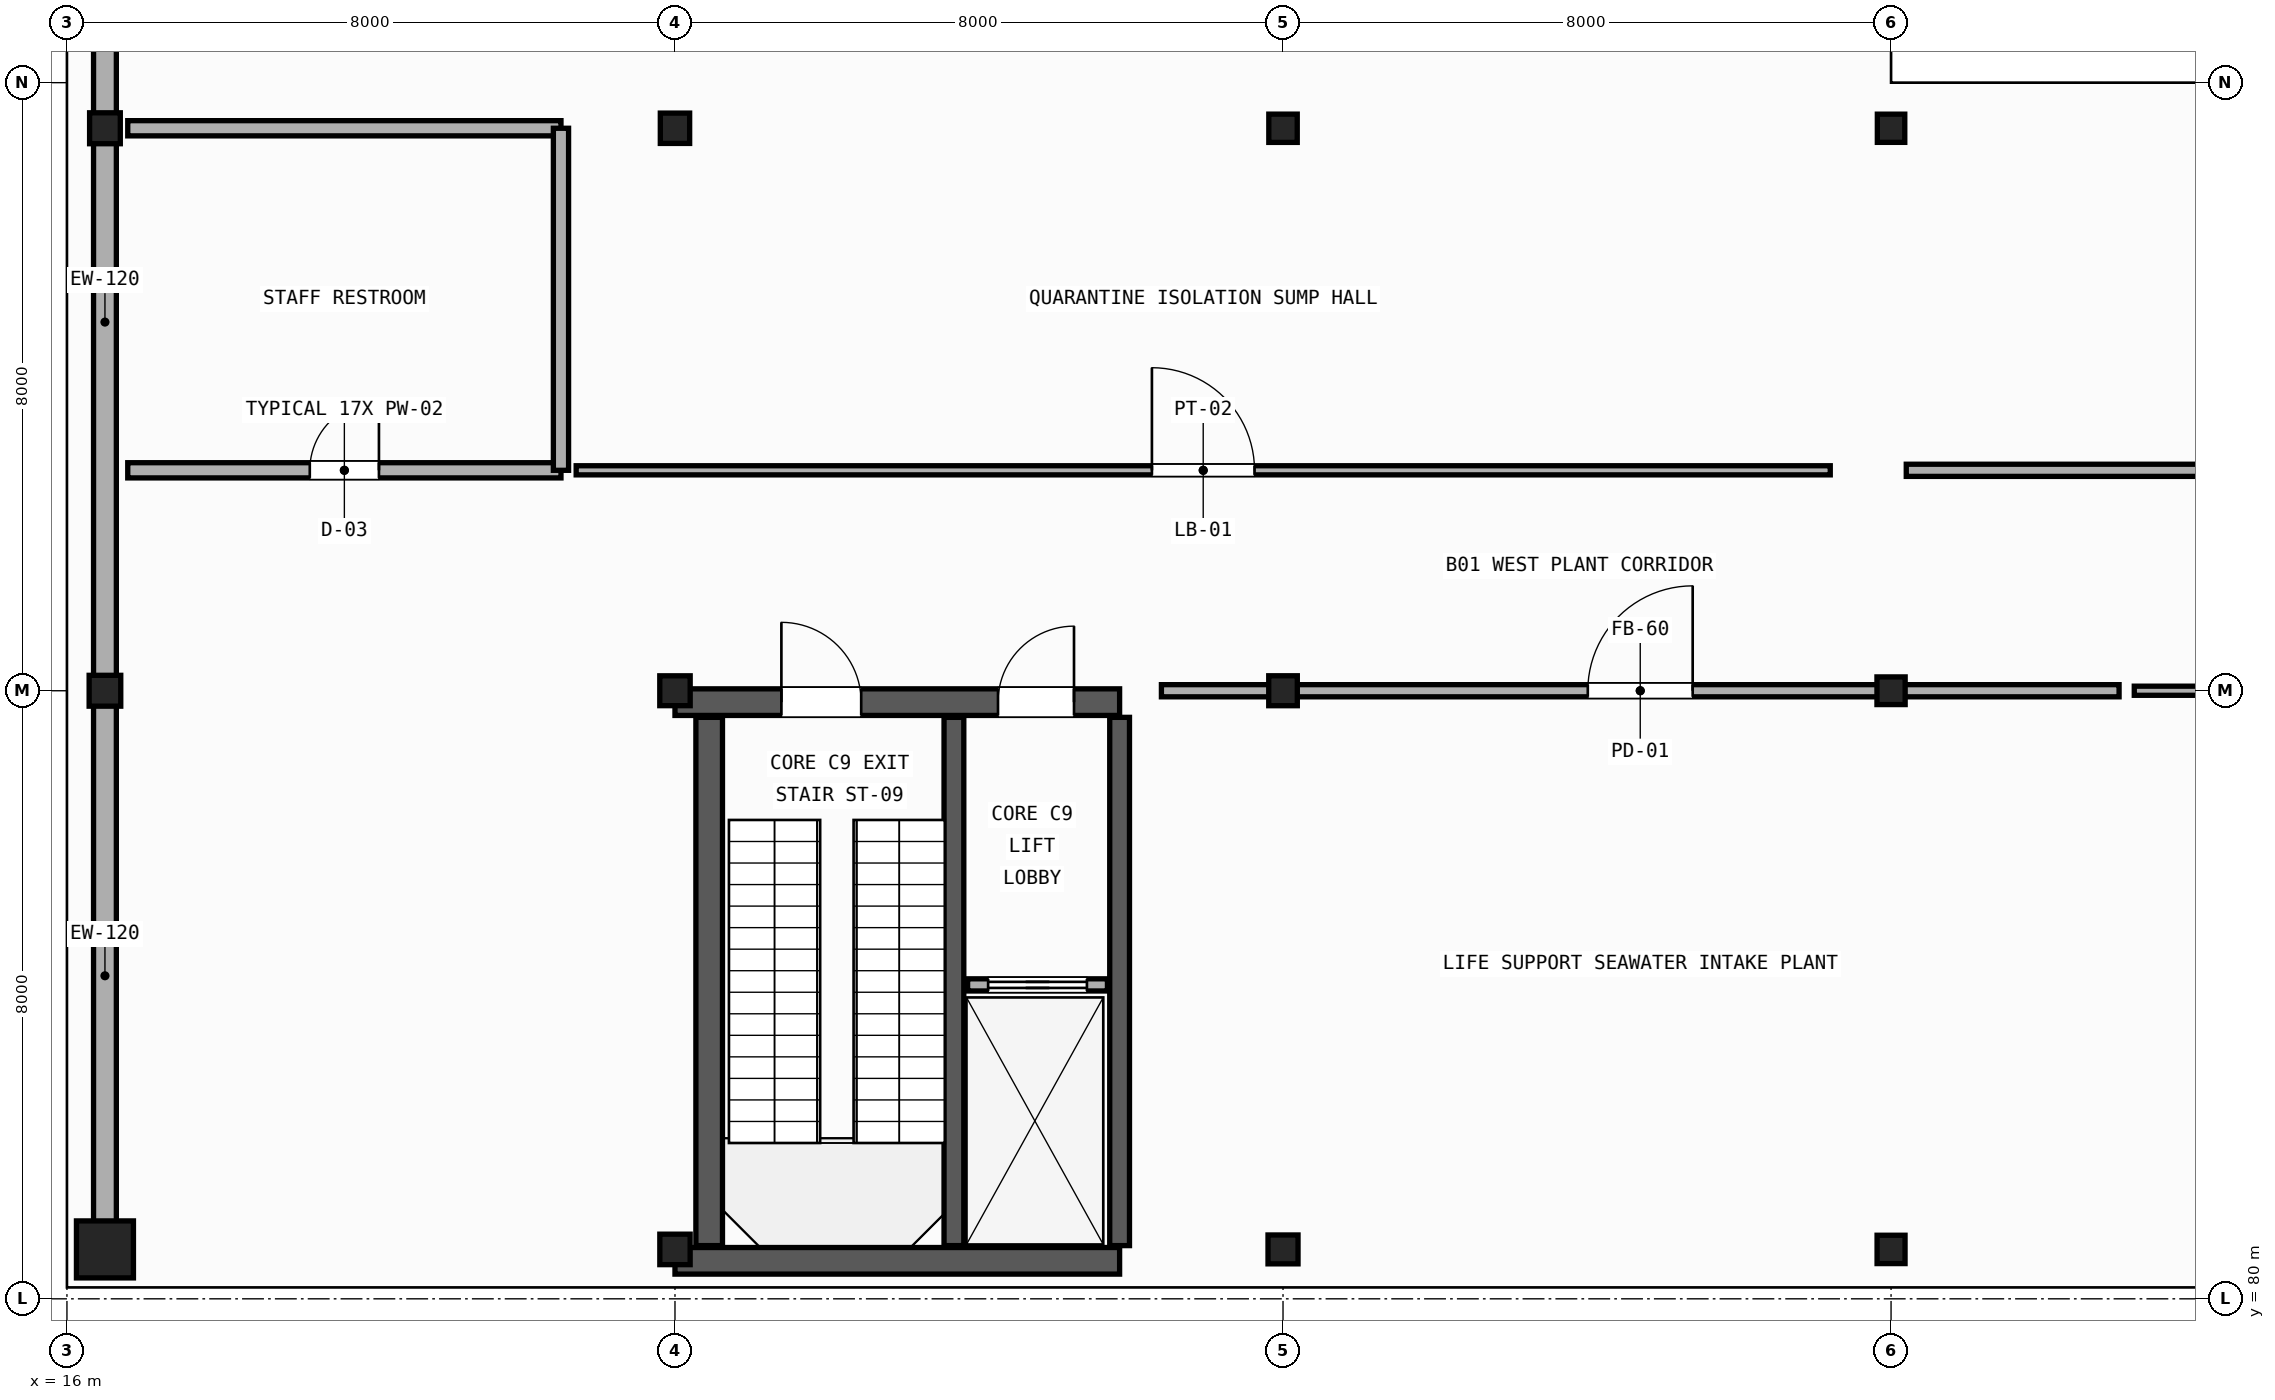
"""IFC4 building model, lengths in metres.
Left out: names, types, materials, properties, quantities, classifications, styles, units other than length and angle.
Written with IfcOpenShell. Run it as: python <this file> out.ifc"""

import sys

from ifc_helpers import new_model, si_unit, direction, frame, frame_2d, origin, origin_2d, place, context, subcontext, project, spatial, rectangle, circle, i_section, extrude, element, fill, save


model = new_model("IFC4")
c1 = context("Model", 3, precision=1e-05, world=origin(), true_north=direction((0.0, 1.0)))
c2 = subcontext(c1, "Body", "Model", "MODEL_VIEW")
j1 = project(units=[si_unit("LENGTHUNIT", "METRE"), si_unit("PLANEANGLEUNIT", "RADIAN")], contexts=[c1])
p1 = place(None, origin())
s1 = spatial("IfcSite", under=j1, at=p1, CompositionType="ELEMENT")
p2 = place(p1, origin())
s2 = spatial("IfcBuilding", under=s1, at=p2, CompositionType="ELEMENT")
p3 = place(p2, frame((0.0, 0.0, -5.4)))
s3 = spatial("IfcBuildingStorey", under=s2, at=p3, CompositionType="ELEMENT", Elevation=-5.4)
p4 = place(p3, frame((16.5, 80.65, 0.0), z_axis=(0.0, 0.0, 1.0), x_axis=(1.0, 0.0, 0.0)))
e1 = element("IfcColumn", 1, at=p4, inside=s3, PredefinedType="COLUMN", context=c2, shape_type="SweptSolid", body=[
    extrude(circle(Radius=0.375, at=origin_2d()), origin(), (0.0, 0.0, 1.0), 5.04),
])
p5 = place(p3, frame((16.5, 88.0, 0.0), z_axis=(0.0, 0.0, 1.0), x_axis=(0.0, 1.0, 0.0)))
e2 = element("IfcColumn", 2, at=p5, inside=s3, PredefinedType="COLUMN", context=c2, shape_type="SweptSolid", body=[
    extrude(i_section(OverallWidth=0.406, OverallDepth=0.416, WebThickness=0.03, FlangeThickness=0.048, FilletRadius=0.015, at=origin_2d()), origin(), (0.0, 0.0, 1.0), 5.04),
])
p6 = place(p3, frame((16.5, 95.4, 0.0), z_axis=(0.0, 0.0, 1.0), x_axis=(1.0, 0.0, 0.0)))
e3 = element("IfcColumn", 3, at=p6, inside=s3, PredefinedType="COLUMN", context=c2, shape_type="SweptSolid", body=[
    extrude(i_section(OverallWidth=0.404, OverallDepth=0.407, WebThickness=0.027, FlangeThickness=0.044, FilletRadius=0.015, at=origin_2d()), origin(), (0.0, 0.0, 1.0), 5.04),
])
p7 = place(p3, frame((24.0, 80.65, 0.0), z_axis=(0.0, 0.0, 1.0), x_axis=(0.0, 1.0, 0.0)))
e4 = element("IfcColumn", 4, at=p7, inside=s3, PredefinedType="COLUMN", context=c2, shape_type="SweptSolid", body=[
    extrude(i_section(OverallWidth=0.401, OverallDepth=0.399, WebThickness=0.025, FlangeThickness=0.04, FilletRadius=0.015, at=origin_2d()), origin(), (0.0, 0.0, 1.0), 5.04),
])
p8 = place(p3, frame((24.0, 88.0, 0.0), z_axis=(0.0, 0.0, 1.0), x_axis=(1.0, 0.0, 0.0)))
e5 = element("IfcColumn", 5, at=p8, inside=s3, PredefinedType="COLUMN", context=c2, shape_type="SweptSolid", body=[
    extrude(i_section(OverallWidth=0.4, OverallDepth=0.393, WebThickness=0.023, FlangeThickness=0.037, FilletRadius=0.015, at=origin_2d()), origin(), (0.0, 0.0, 1.0), 5.04),
])
p9 = place(p3, frame((24.0, 95.4, 0.0), z_axis=(0.0, 0.0, 1.0), x_axis=(0.0, 1.0, 0.0)))
e6 = element("IfcColumn", 6, at=p9, inside=s3, PredefinedType="COLUMN", context=c2, shape_type="SweptSolid", body=[
    extrude(i_section(OverallWidth=0.399, OverallDepth=0.386, WebThickness=0.021, FlangeThickness=0.033, FilletRadius=0.015, at=origin_2d()), origin(), (0.0, 0.0, 1.0), 5.04),
])
p10 = place(p3, frame((32.0, 80.65, 0.0), z_axis=(0.0, 0.0, 1.0), x_axis=(1.0, 0.0, 0.0)))
e7 = element("IfcColumn", 7, at=p10, inside=s3, PredefinedType="COLUMN", context=c2, shape_type="SweptSolid", body=[
    extrude(i_section(OverallWidth=0.395, OverallDepth=0.38, WebThickness=0.019, FlangeThickness=0.03, FilletRadius=0.015, at=origin_2d()), origin(), (0.0, 0.0, 1.0), 5.04),
])
p11 = place(p3, frame((32.0, 88.0, 0.0), z_axis=(0.0, 0.0, 1.0), x_axis=(0.0, 1.0, 0.0)))
e8 = element("IfcColumn", 8, at=p11, inside=s3, PredefinedType="COLUMN", context=c2, shape_type="SweptSolid", body=[
    extrude(i_section(OverallWidth=0.394, OverallDepth=0.376, WebThickness=0.017, FlangeThickness=0.028, FilletRadius=0.015, at=origin_2d()), origin(), (0.0, 0.0, 1.0), 5.04),
])
p12 = place(p3, frame((32.0, 95.4, 0.0), z_axis=(0.0, 0.0, 1.0), x_axis=(1.0, 0.0, 0.0)))
e9 = element("IfcColumn", 9, at=p12, inside=s3, PredefinedType="COLUMN", context=c2, shape_type="SweptSolid", body=[
    extrude(i_section(OverallWidth=0.374, OverallDepth=0.372, WebThickness=0.016, FlangeThickness=0.026, FilletRadius=0.015, at=origin_2d()), origin(), (0.0, 0.0, 1.0), 5.04),
])
p13 = place(p3, frame((40.0, 80.65, 0.0), z_axis=(0.0, 0.0, 1.0), x_axis=(0.0, 1.0, 0.0)))
e10 = element("IfcColumn", 10, at=p13, inside=s3, PredefinedType="COLUMN", context=c2, shape_type="SweptSolid", body=[
    extrude(i_section(OverallWidth=0.373, OverallDepth=0.368, WebThickness=0.015, FlangeThickness=0.024, FilletRadius=0.015, at=origin_2d()), origin(), (0.0, 0.0, 1.0), 5.04),
])
p14 = place(p3, frame((40.0, 88.0, 0.0), z_axis=(0.0, 0.0, 1.0), x_axis=(1.0, 0.0, 0.0)))
e11 = element("IfcColumn", 11, at=p14, inside=s3, PredefinedType="COLUMN", context=c2, shape_type="SweptSolid", body=[
    extrude(i_section(OverallWidth=0.371, OverallDepth=0.364, WebThickness=0.013, FlangeThickness=0.022, FilletRadius=0.015, at=origin_2d()), origin(), (0.0, 0.0, 1.0), 5.04),
])
p15 = place(p3, frame((40.0, 95.4, 0.0), z_axis=(0.0, 0.0, 1.0), x_axis=(0.0, 1.0, 0.0)))
e12 = element("IfcColumn", 12, at=p15, inside=s3, PredefinedType="COLUMN", context=c2, shape_type="SweptSolid", body=[
    extrude(i_section(OverallWidth=0.371, OverallDepth=0.361, WebThickness=0.012, FlangeThickness=0.02, FilletRadius=0.015, at=origin_2d()), origin(), (0.0, 0.0, 1.0), 5.04),
])
p16 = place(p3, frame((16.5, 80.5, 0.0), z_axis=(0.0, 0.0, 1.0), x_axis=(0.0, 1.0, 0.0)))
e13 = element("IfcWall", 13, at=p16, inside=s3, PredefinedType="STANDARD", context=c2, shape_type="SweptSolid", body=[
    extrude(rectangle(XDim=7.5, YDim=0.3, at=frame_2d((3.75, 0.0))), origin(), (0.0, 0.0, 1.0), 4.317),
])
p17 = place(p3, frame((16.5, 88.0, 0.0), z_axis=(0.0, 0.0, 1.0), x_axis=(0.0, 1.0, 0.0)))
e14 = element("IfcWall", 14, at=p17, inside=s3, PredefinedType="STANDARD", context=c2, shape_type="SweptSolid", body=[
    extrude(rectangle(XDim=9.7, YDim=0.3, at=frame_2d((4.85, 0.0))), origin(), (0.0, 0.0, 1.0), 4.317),
])
p18 = place(p3, frame((24.0, 87.85, 0.0), z_axis=(0.0, 0.0, 1.0), x_axis=(1.0, 0.0, 0.0)))
e15 = element("IfcWall", 15, at=p18, inside=s3, PredefinedType="SHEAR", context=c2, shape_type="SweptSolid", body=[
    extrude(rectangle(XDim=5.85, YDim=0.35, at=frame_2d((2.925, 0.0))), origin(), (0.0, 0.0, 1.0), 5.03),
])
p19 = place(p18, frame((1.4, 0.0, 0.0)))
e16 = element("IfcOpeningElement", 16, at=p19, cuts=e15, PredefinedType="OPENING", context=c2, shape_type="SweptSolid", body=[
    extrude(rectangle(XDim=1.05, YDim=2.1, at=frame_2d((0.525, 1.05))), frame((0.0, 0.185, 0.0), z_axis=(0.0, -1.0, 0.0), x_axis=(1.0, 0.0, 0.0)), (0.0, 0.0, 1.0), 0.37),
])
p20 = place(p18, frame((4.25, 0.0, 0.0)))
e17 = element("IfcOpeningElement", 17, at=p20, cuts=e15, PredefinedType="OPENING", context=c2, shape_type="SweptSolid", body=[
    extrude(rectangle(XDim=1.0, YDim=2.15, at=frame_2d((0.5, 1.075))), frame((0.0, 0.185, 0.0), z_axis=(0.0, -1.0, 0.0), x_axis=(1.0, 0.0, 0.0)), (0.0, 0.0, 1.0), 0.37),
])
p21 = place(p3, frame((24.0, 80.5, 0.0), z_axis=(0.0, 0.0, 1.0), x_axis=(1.0, 0.0, 0.0)))
e18 = element("IfcWall", 18, at=p21, inside=s3, PredefinedType="SHEAR", context=c2, shape_type="SweptSolid", body=[
    extrude(rectangle(XDim=5.85, YDim=0.35, at=frame_2d((2.925, 0.0))), origin(), (0.0, 0.0, 1.0), 5.03),
])
p22 = place(p3, frame((24.45, 80.7, 0.0), z_axis=(0.0, 0.0, 1.0), x_axis=(0.0, 1.0, 0.0)))
e19 = element("IfcWall", 19, at=p22, inside=s3, PredefinedType="SHEAR", context=c2, shape_type="SweptSolid", body=[
    extrude(rectangle(XDim=6.95, YDim=0.35, at=frame_2d((3.475, 0.0))), origin(), (0.0, 0.0, 1.0), 5.03),
])
for number, where, z_axis, x_axis in (
    (20, (29.85, 80.7, 0.0), (0.0, 0.0, 1.0), (0.0, 1.0, 0.0)),
    (21, (27.67, 80.7, 0.0), (0.0, 0.0, 1.0), (0.0, 1.0, 0.0)),
):
    element("IfcWall", number, at=place(p3, frame(where, z_axis=z_axis, x_axis=x_axis)), inside=s3, PredefinedType="SHEAR", context=c2, shape_type="SweptSolid", body=[
        extrude(rectangle(XDim=6.95, YDim=0.26, at=frame_2d((3.475, 0.0))), origin(), (0.0, 0.0, 1.0), 5.03),
    ])
p23 = place(p3, frame((27.85, 84.13, 0.0), z_axis=(0.0, 0.0, 1.0), x_axis=(1.0, 0.0, 0.0)))
e22 = element("IfcWall", 22, at=p23, inside=s3, PredefinedType="PARTITIONING", context=c2, shape_type="SweptSolid", body=[
    extrude(rectangle(XDim=1.84, YDim=0.16, at=frame_2d((0.92, 0.0))), origin(), (0.0, 0.0, 1.0), 3.6),
])
p24 = place(p23, frame((0.27, 0.0, 0.0)))
e23 = element("IfcOpeningElement", 23, at=p24, cuts=e22, PredefinedType="OPENING", context=c2, shape_type="SweptSolid", body=[
    extrude(rectangle(XDim=1.3, YDim=2.2, at=frame_2d((0.65, 1.1))), frame((0.0, 0.09, 0.0), z_axis=(0.0, -1.0, 0.0), x_axis=(1.0, 0.0, 0.0)), (0.0, 0.0, 1.0), 0.18),
])
p25 = place(p3, frame((30.4, 88.0, 0.0), z_axis=(0.0, 0.0, 1.0), x_axis=(1.0, 0.0, 0.0)))
e24 = element("IfcWall", 24, at=p25, inside=s3, PredefinedType="PARTITIONING", context=c2, shape_type="SweptSolid", body=[
    extrude(rectangle(XDim=12.6, YDim=0.16, at=frame_2d((6.3, 0.0))), origin(), (0.0, 0.0, 1.0), 4.29),
])
p26 = place(p25, frame((5.61, 0.0, 0.0)))
e25 = element("IfcOpeningElement", 25, at=p26, cuts=e24, PredefinedType="OPENING", context=c2, shape_type="SweptSolid", body=[
    extrude(rectangle(XDim=1.38, YDim=2.25, at=frame_2d((0.69, 1.125))), frame((0.0, 0.09, 0.0), z_axis=(0.0, -1.0, 0.0), x_axis=(1.0, 0.0, 0.0)), (0.0, 0.0, 1.0), 0.18),
])
p27 = place(p3, frame((43.2, 88.0, 0.0), z_axis=(0.0, 0.0, 1.0), x_axis=(1.0, 0.0, 0.0)))
e26 = element("IfcWall", 26, at=p27, inside=s3, PredefinedType="PARTITIONING", context=c2, shape_type="SweptSolid", body=[
    extrude(rectangle(XDim=11.8, YDim=0.12, at=frame_2d((5.9, 0.0))), origin(), (0.0, 0.0, 1.0), 4.238),
])
p28 = place(p27, frame((6.685, 0.0, 0.0)))
e27 = element("IfcOpeningElement", 27, at=p28, cuts=e26, PredefinedType="OPENING", context=c2, shape_type="SweptSolid", body=[
    extrude(rectangle(XDim=1.8, YDim=2.4, at=frame_2d((0.9, 1.2))), frame((0.0, 0.07, 0.0), z_axis=(0.0, -1.0, 0.0), x_axis=(1.0, 0.0, 0.0)), (0.0, 0.0, 1.0), 0.14),
])
p29 = place(p3, frame((16.8, 90.9, 0.0), z_axis=(0.0, 0.0, 1.0), x_axis=(1.0, 0.0, 0.0)))
e28 = element("IfcWall", 28, at=p29, inside=s3, PredefinedType="PLUMBINGWALL", context=c2, shape_type="SweptSolid", body=[
    extrude(rectangle(XDim=5.7, YDim=0.2, at=frame_2d((2.85, 0.0))), origin(), (0.0, 0.0, 1.0), 4.29),
])
p30 = place(p29, frame((2.395, 0.0, 0.0)))
e29 = element("IfcOpeningElement", 29, at=p30, cuts=e28, PredefinedType="OPENING", context=c2, shape_type="SweptSolid", body=[
    extrude(rectangle(XDim=0.91, YDim=2.1, at=frame_2d((0.455, 1.05))), frame((0.0, 0.11, 0.0), z_axis=(0.0, -1.0, 0.0), x_axis=(1.0, 0.0, 0.0)), (0.0, 0.0, 1.0), 0.22),
])
p31 = place(p3, frame((16.8, 95.4, 0.0), z_axis=(0.0, 0.0, 1.0), x_axis=(1.0, 0.0, 0.0)))
e30 = element("IfcWall", 30, at=p31, inside=s3, PredefinedType="PLUMBINGWALL", context=c2, shape_type="SweptSolid", body=[
    extrude(rectangle(XDim=5.7, YDim=0.2, at=frame_2d((2.85, 0.0))), origin(), (0.0, 0.0, 1.0), 4.29),
])
p32 = place(p3, frame((22.5, 90.9, 0.0), z_axis=(0.0, 0.0, 1.0), x_axis=(0.0, 1.0, 0.0)))
e31 = element("IfcWall", 31, at=p32, inside=s3, PredefinedType="PLUMBINGWALL", context=c2, shape_type="SweptSolid", body=[
    extrude(rectangle(XDim=4.5, YDim=0.2, at=frame_2d((2.25, 0.0))), origin(), (0.0, 0.0, 1.0), 4.29),
])
p33 = place(p3, frame((22.7, 90.9, 0.0), z_axis=(0.0, 0.0, 1.0), x_axis=(1.0, 0.0, 0.0)))
e32 = element("IfcWall", 32, at=p33, inside=s3, PredefinedType="PARTITIONING", context=c2, shape_type="SweptSolid", body=[
    extrude(rectangle(XDim=16.5, YDim=0.12, at=frame_2d((8.25, 0.0))), origin(), (0.0, 0.0, 1.0), 4.29),
])
p34 = place(p33, frame((7.575, 0.0, 0.0)))
e33 = element("IfcOpeningElement", 33, at=p34, cuts=e32, PredefinedType="OPENING", context=c2, shape_type="SweptSolid", body=[
    extrude(rectangle(XDim=1.35, YDim=2.25, at=frame_2d((0.675, 1.125))), frame((0.0, 0.07, 0.0), z_axis=(0.0, -1.0, 0.0), x_axis=(1.0, 0.0, 0.0)), (0.0, 0.0, 1.0), 0.14),
])
p35 = place(p3, frame((40.2, 90.9, 0.0), z_axis=(0.0, 0.0, 1.0), x_axis=(1.0, 0.0, 0.0)))
e34 = element("IfcWall", 34, at=p35, inside=s3, PredefinedType="PARTITIONING", context=c2, shape_type="SweptSolid", body=[
    extrude(rectangle(XDim=14.8, YDim=0.16, at=frame_2d((7.4, 0.0))), origin(), (0.0, 0.0, 1.0), 4.238),
])
p36 = place(p35, frame((6.775, 0.0, 0.0)))
e35 = element("IfcOpeningElement", 35, at=p36, cuts=e34, PredefinedType="OPENING", context=c2, shape_type="SweptSolid", body=[
    extrude(rectangle(XDim=1.25, YDim=2.2, at=frame_2d((0.625, 1.1))), frame((0.0, 0.09, 0.0), z_axis=(0.0, -1.0, 0.0), x_axis=(1.0, 0.0, 0.0)), (0.0, 0.0, 1.0), 0.18),
])
p37 = place(p24, origin())
e36 = element("IfcDoor", 36, at=p37, inside=s3, OperationType="SLIDING_TO_LEFT", PredefinedType="DOOR", context=c2, shape_type="SweptSolid", body=[
    extrude(rectangle(XDim=1.3, YDim=2.2, at=frame_2d((0.65, 1.1))), frame((0.0, 0.025, 0.0), z_axis=(0.0, -1.0, 0.0), x_axis=(1.0, 0.0, 0.0)), (0.0, 0.0, 1.0), 0.05),
])
fill(e23, e36)
p38 = place(p19, origin())
e37 = element("IfcDoor", 37, at=p38, inside=s3, OperationType="SINGLE_SWING_LEFT", PredefinedType="DOOR", context=c2, shape_type="SweptSolid", body=[
    extrude(rectangle(XDim=1.05, YDim=2.1, at=frame_2d((0.525, 1.05))), frame((0.0, 0.025, 0.0), z_axis=(0.0, -1.0, 0.0), x_axis=(1.0, 0.0, 0.0)), (0.0, 0.0, 1.0), 0.05),
])
fill(e16, e37)
p39 = place(p20, origin())
e38 = element("IfcDoor", 38, at=p39, inside=s3, OperationType="SINGLE_SWING_RIGHT", PredefinedType="DOOR", context=c2, shape_type="SweptSolid", body=[
    extrude(rectangle(XDim=1.0, YDim=2.15, at=frame_2d((0.5, 1.075))), frame((0.0, 0.025, 0.0), z_axis=(0.0, -1.0, 0.0), x_axis=(1.0, 0.0, 0.0)), (0.0, 0.0, 1.0), 0.05),
])
fill(e17, e38)
p40 = place(p26, origin())
e39 = element("IfcDoor", 39, at=p40, inside=s3, OperationType="SINGLE_SWING_RIGHT", PredefinedType="DOOR", context=c2, shape_type="SweptSolid", body=[
    extrude(rectangle(XDim=1.38, YDim=2.25, at=frame_2d((0.69, 1.125))), frame((0.0, 0.025, 0.0), z_axis=(0.0, -1.0, 0.0), x_axis=(1.0, 0.0, 0.0)), (0.0, 0.0, 1.0), 0.05),
])
fill(e25, e39)
p41 = place(p30, origin())
e40 = element("IfcDoor", 40, at=p41, inside=s3, OperationType="SINGLE_SWING_RIGHT", PredefinedType="DOOR", context=c2, shape_type="SweptSolid", body=[
    extrude(rectangle(XDim=0.91, YDim=2.1, at=frame_2d((0.455, 1.05))), frame((0.0, 0.025, 0.0), z_axis=(0.0, -1.0, 0.0), x_axis=(1.0, 0.0, 0.0)), (0.0, 0.0, 1.0), 0.05),
])
fill(e29, e40)
p42 = place(p34, origin())
e41 = element("IfcDoor", 41, at=p42, inside=s3, OperationType="SINGLE_SWING_LEFT", PredefinedType="DOOR", context=c2, shape_type="SweptSolid", body=[
    extrude(rectangle(XDim=1.35, YDim=2.25, at=frame_2d((0.675, 1.125))), frame((0.0, 0.025, 0.0), z_axis=(0.0, -1.0, 0.0), x_axis=(1.0, 0.0, 0.0)), (0.0, 0.0, 1.0), 0.05),
])
fill(e33, e41)
save(model, sys.argv[1])
